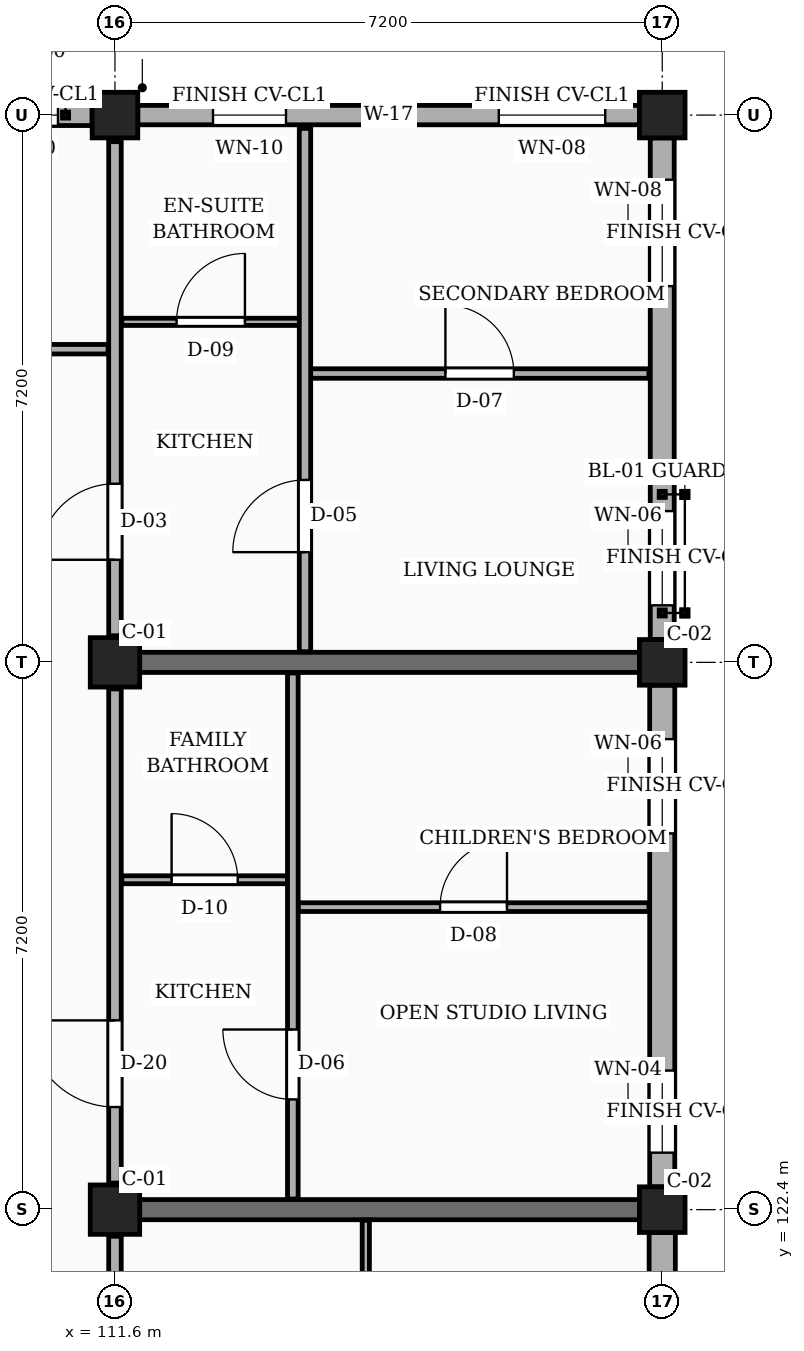
"""IFC4 building model, lengths in metres.
Left out: names, types, materials, properties, quantities, classifications, styles, units other than length and angle.
Written with IfcOpenShell. Run it as: python <this file> out.ifc"""

import sys

from ifc_helpers import new_model, si_unit, direction, frame, frame_2d, origin, origin_2d, place, context, subcontext, project, spatial, rectangle, extrude, element, fill, save


model = new_model("IFC4")
c1 = context("Model", 3, precision=1e-05, world=origin(), true_north=direction((0.0, 1.0)))
c2 = subcontext(c1, "Body", "Model", "MODEL_VIEW")
j1 = project(units=[si_unit("LENGTHUNIT", "METRE"), si_unit("PLANEANGLEUNIT", "RADIAN")], contexts=[c1])
p1 = place(None, origin())
s1 = spatial("IfcSite", under=j1, at=p1, CompositionType="ELEMENT")
p2 = place(p1, origin())
s2 = spatial("IfcBuilding", under=s1, at=p2, CompositionType="ELEMENT")
p3 = place(p2, frame((0.0, 0.0, 7.65)))
s3 = spatial("IfcBuildingStorey", under=s2, at=p3, CompositionType="ELEMENT", Elevation=7.65)
for number, where, z_axis, x_axis in (
    (1, (111.6, 122.4, 0.0), (0.0, 0.0, 1.0), (1.0, 0.0, 0.0)),
    (2, (111.6, 129.6, 0.0), (0.0, 0.0, 1.0), (1.0, 0.0, 0.0)),
):
    element("IfcColumn", number, at=place(p3, frame(where, z_axis=z_axis, x_axis=x_axis)), inside=s3, PredefinedType="COLUMN", context=c2, shape_type="SweptSolid", body=[
        extrude(rectangle(XDim=0.65, YDim=0.65, at=origin_2d()), origin(), (0.0, 0.0, 1.0), 3.15),
    ])
for number, where, z_axis, x_axis in (
    (3, (111.6, 136.8, 0.0), (0.0, 0.0, 1.0), (1.0, 0.0, 0.0)),
    (4, (118.8, 122.4, 0.0), (0.0, 0.0, 1.0), (1.0, 0.0, 0.0)),
    (5, (118.8, 129.6, 0.0), (0.0, 0.0, 1.0), (1.0, 0.0, 0.0)),
    (6, (118.8, 136.8, 0.0), (0.0, 0.0, 1.0), (1.0, 0.0, 0.0)),
):
    element("IfcColumn", number, at=place(p3, frame(where, z_axis=z_axis, x_axis=x_axis)), inside=s3, PredefinedType="COLUMN", context=c2, shape_type="SweptSolid", body=[
        extrude(rectangle(XDim=0.6, YDim=0.6, at=origin_2d()), origin(), (0.0, 0.0, 1.0), 3.15),
    ])
for number, where, z_axis, x_axis in (
    (7, (111.925, 122.4, 0.0), (0.0, 0.0, 1.0), (1.0, 0.0, 0.0)),
    (8, (111.925, 129.6, 0.0), (0.0, 0.0, 1.0), (1.0, 0.0, 0.0)),
):
    element("IfcWall", number, at=place(p3, frame(where, z_axis=z_axis, x_axis=x_axis)), inside=s3, PredefinedType="SOLIDWALL", context=c2, shape_type="SweptSolid", body=[
        extrude(rectangle(XDim=6.575, YDim=0.265, at=frame_2d((3.288, 0.0))), origin(), (0.0, 0.0, 1.0), 2.19),
    ])
p4 = place(p3, frame((118.8, 115.5, 0.0), z_axis=(0.0, 0.0, 1.0), x_axis=(0.0, 1.0, 0.0)))
e9 = element("IfcWall", 9, at=p4, inside=s3, PredefinedType="SOLIDWALL", context=c2, shape_type="SweptSolid", body=[
    extrude(rectangle(XDim=6.6, YDim=0.345, at=frame_2d((3.3, 0.0))), origin(), (0.0, 0.0, 1.0), 2.46),
])
p5 = place(p4, frame((0.45, 0.0, 0.78)))
e10 = element("IfcOpeningElement", 10, at=p5, cuts=e9, PredefinedType="OPENING", context=c2, shape_type="SweptSolid", body=[
    extrude(rectangle(XDim=0.92, YDim=1.15, at=frame_2d((0.46, 0.575))), frame((0.0, 0.183, 0.0), z_axis=(0.0, -1.0, 0.0), x_axis=(1.0, 0.0, 0.0)), (0.0, 0.0, 1.0), 0.365),
])
p6 = place(p4, frame((4.65, 0.0, 0.78)))
e11 = element("IfcOpeningElement", 11, at=p6, cuts=e9, PredefinedType="OPENING", context=c2, shape_type="SweptSolid", body=[
    extrude(rectangle(XDim=1.08, YDim=1.15, at=frame_2d((0.54, 0.575))), frame((0.0, 0.183, 0.0), z_axis=(0.0, -1.0, 0.0), x_axis=(1.0, 0.0, 0.0)), (0.0, 0.0, 1.0), 0.365),
])
p7 = place(p3, frame((118.8, 122.7, 0.0), z_axis=(0.0, 0.0, 1.0), x_axis=(0.0, 1.0, 0.0)))
e12 = element("IfcWall", 12, at=p7, inside=s3, PredefinedType="SOLIDWALL", context=c2, shape_type="SweptSolid", body=[
    extrude(rectangle(XDim=6.6, YDim=0.33, at=frame_2d((3.3, 0.0))), origin(), (0.0, 0.0, 1.0), 2.46),
])
p8 = place(p7, frame((0.45, 0.0, 0.78)))
e13 = element("IfcOpeningElement", 13, at=p8, cuts=e12, PredefinedType="OPENING", context=c2, shape_type="SweptSolid", body=[
    extrude(rectangle(XDim=1.08, YDim=1.15, at=frame_2d((0.54, 0.575))), frame((0.0, 0.175, 0.0), z_axis=(0.0, -1.0, 0.0), x_axis=(1.0, 0.0, 0.0)), (0.0, 0.0, 1.0), 0.35),
])
p9 = place(p7, frame((4.65, 0.0, 0.78)))
e14 = element("IfcOpeningElement", 14, at=p9, cuts=e12, PredefinedType="OPENING", context=c2, shape_type="SweptSolid", body=[
    extrude(rectangle(XDim=1.24, YDim=1.15, at=frame_2d((0.62, 0.575))), frame((0.0, 0.175, 0.0), z_axis=(0.0, -1.0, 0.0), x_axis=(1.0, 0.0, 0.0)), (0.0, 0.0, 1.0), 0.35),
])
p10 = place(p3, frame((118.8, 129.9, 0.0), z_axis=(0.0, 0.0, 1.0), x_axis=(0.0, 1.0, 0.0)))
e15 = element("IfcWall", 15, at=p10, inside=s3, PredefinedType="SOLIDWALL", context=c2, shape_type="SweptSolid", body=[
    extrude(rectangle(XDim=6.6, YDim=0.315, at=frame_2d((3.3, 0.0))), origin(), (0.0, 0.0, 1.0), 2.46),
])
p11 = place(p10, frame((0.45, 0.0, 0.78)))
e16 = element("IfcOpeningElement", 16, at=p11, cuts=e15, PredefinedType="OPENING", context=c2, shape_type="SweptSolid", body=[
    extrude(rectangle(XDim=1.24, YDim=1.15, at=frame_2d((0.62, 0.575))), frame((0.0, 0.167, 0.0), z_axis=(0.0, -1.0, 0.0), x_axis=(1.0, 0.0, 0.0)), (0.0, 0.0, 1.0), 0.335),
])
p12 = place(p10, frame((4.65, 0.0, 0.78)))
e17 = element("IfcOpeningElement", 17, at=p12, cuts=e15, PredefinedType="OPENING", context=c2, shape_type="SweptSolid", body=[
    extrude(rectangle(XDim=1.4, YDim=1.15, at=frame_2d((0.7, 0.575))), frame((0.0, 0.167, 0.0), z_axis=(0.0, -1.0, 0.0), x_axis=(1.0, 0.0, 0.0)), (0.0, 0.0, 1.0), 0.335),
])
p13 = place(p3, frame((118.5, 136.8, 0.0), z_axis=(0.0, 0.0, 1.0), x_axis=(-1.0, 0.0, 0.0)))
e18 = element("IfcWall", 18, at=p13, inside=s3, PredefinedType="SOLIDWALL", context=c2, shape_type="SweptSolid", body=[
    extrude(rectangle(XDim=6.6, YDim=0.255, at=frame_2d((3.3, 0.0))), origin(), (0.0, 0.0, 1.0), 2.46),
])
p14 = place(p13, frame((0.45, 0.0, 0.78)))
e19 = element("IfcOpeningElement", 19, at=p14, cuts=e18, PredefinedType="OPENING", context=c2, shape_type="SweptSolid", body=[
    extrude(rectangle(XDim=1.4, YDim=1.15, at=frame_2d((0.7, 0.575))), frame((0.0, 0.137, 0.0), z_axis=(0.0, -1.0, 0.0), x_axis=(1.0, 0.0, 0.0)), (0.0, 0.0, 1.0), 0.275),
])
p15 = place(p13, frame((4.65, 0.0, 0.78)))
e20 = element("IfcOpeningElement", 20, at=p15, cuts=e18, PredefinedType="OPENING", context=c2, shape_type="SweptSolid", body=[
    extrude(rectangle(XDim=0.96, YDim=1.26, at=frame_2d((0.48, 0.63))), frame((0.0, 0.137, 0.0), z_axis=(0.0, -1.0, 0.0), x_axis=(1.0, 0.0, 0.0)), (0.0, 0.0, 1.0), 0.275),
])
p16 = place(p3, frame((111.3, 136.8, 0.0), z_axis=(0.0, 0.0, 1.0), x_axis=(-1.0, 0.0, 0.0)))
e21 = element("IfcWall", 21, at=p16, inside=s3, PredefinedType="SOLIDWALL", context=c2, shape_type="SweptSolid", body=[
    extrude(rectangle(XDim=6.6, YDim=0.275, at=frame_2d((3.3, 0.0))), origin(), (0.0, 0.0, 1.0), 2.46),
])
p17 = place(p16, frame((0.45, 0.0, 0.78)))
e22 = element("IfcOpeningElement", 22, at=p17, cuts=e21, PredefinedType="OPENING", context=c2, shape_type="SweptSolid", body=[
    extrude(rectangle(XDim=0.96, YDim=1.26, at=frame_2d((0.48, 0.63))), frame((0.0, 0.147, 0.0), z_axis=(0.0, -1.0, 0.0), x_axis=(1.0, 0.0, 0.0)), (0.0, 0.0, 1.0), 0.295),
])
p18 = place(p16, frame((4.65, 0.0, 0.78)))
e23 = element("IfcOpeningElement", 23, at=p18, cuts=e21, PredefinedType="OPENING", context=c2, shape_type="SweptSolid", body=[
    extrude(rectangle(XDim=1.12, YDim=1.26, at=frame_2d((0.56, 0.63))), frame((0.0, 0.147, 0.0), z_axis=(0.0, -1.0, 0.0), x_axis=(1.0, 0.0, 0.0)), (0.0, 0.0, 1.0), 0.295),
])
p19 = place(p3, frame((111.6, 115.55, 0.0), z_axis=(0.0, 0.0, 1.0), x_axis=(0.0, 1.0, 0.0)))
e24 = element("IfcWall", 24, at=p19, inside=s3, PredefinedType="PARTITIONING", context=c2, shape_type="SweptSolid", body=[
    extrude(rectangle(XDim=6.5, YDim=0.165, at=frame_2d((3.25, 0.0))), origin(), (0.0, 0.0, 1.0), 2.24),
])
p20 = place(p19, frame((1.1, 0.0, 0.0)))
e25 = element("IfcOpeningElement", 25, at=p20, cuts=e24, PredefinedType="OPENING", context=c2, shape_type="SweptSolid", body=[
    extrude(rectangle(XDim=0.94, YDim=2.12, at=frame_2d((0.47, 1.06))), frame((0.0, 0.093, 0.0), z_axis=(0.0, -1.0, 0.0), x_axis=(1.0, 0.0, 0.0)), (0.0, 0.0, 1.0), 0.185),
])
p21 = place(p3, frame((111.6, 122.75, 0.0), z_axis=(0.0, 0.0, 1.0), x_axis=(0.0, 1.0, 0.0)))
e26 = element("IfcWall", 26, at=p21, inside=s3, PredefinedType="PARTITIONING", context=c2, shape_type="SweptSolid", body=[
    extrude(rectangle(XDim=6.5, YDim=0.165, at=frame_2d((3.25, 0.0))), origin(), (0.0, 0.0, 1.0), 2.24),
])
p22 = place(p21, frame((1.0, 0.0, 0.0)))
e27 = element("IfcOpeningElement", 27, at=p22, cuts=e26, PredefinedType="OPENING", context=c2, shape_type="SweptSolid", body=[
    extrude(rectangle(XDim=1.14, YDim=2.18, at=frame_2d((0.57, 1.09))), frame((0.0, 0.093, 0.0), z_axis=(0.0, -1.0, 0.0), x_axis=(1.0, 0.0, 0.0)), (0.0, 0.0, 1.0), 0.185),
])
p23 = place(p3, frame((111.6, 129.95, 0.0), z_axis=(0.0, 0.0, 1.0), x_axis=(0.0, 1.0, 0.0)))
e28 = element("IfcWall", 28, at=p23, inside=s3, PredefinedType="PARTITIONING", context=c2, shape_type="SweptSolid", body=[
    extrude(rectangle(XDim=6.5, YDim=0.165, at=frame_2d((3.25, 0.0))), origin(), (0.0, 0.0, 1.0), 2.24),
])
p24 = place(p23, frame((1.0, 0.0, 0.0)))
e29 = element("IfcOpeningElement", 29, at=p24, cuts=e28, PredefinedType="OPENING", context=c2, shape_type="SweptSolid", body=[
    extrude(rectangle(XDim=1.0, YDim=2.15, at=frame_2d((0.5, 1.075))), frame((0.0, 0.093, 0.0), z_axis=(0.0, -1.0, 0.0), x_axis=(1.0, 0.0, 0.0)), (0.0, 0.0, 1.0), 0.185),
])
p25 = place(p3, frame((114.9, 119.07, 0.0), z_axis=(0.0, 0.0, 1.0), x_axis=(0.0, 1.0, 0.0)))
e30 = element("IfcWall", 30, at=p25, inside=s3, PredefinedType="PARTITIONING", context=c2, shape_type="SweptSolid", body=[
    extrude(rectangle(XDim=3.19, YDim=0.095, at=frame_2d((1.595, 0.0))), origin(), (0.0, 0.0, 1.0), 2.325),
])
p26 = place(p3, frame((114.01, 126.38, 0.0), z_axis=(0.0, 0.0, 1.0), x_axis=(1.0, 0.0, 0.0)))
e31 = element("IfcWall", 31, at=p26, inside=s3, PredefinedType="PARTITIONING", context=c2, shape_type="SweptSolid", body=[
    extrude(rectangle(XDim=4.615, YDim=0.115, at=frame_2d((2.308, 0.0))), origin(), (0.0, 0.0, 1.0), 2.325),
])
p27 = place(p26, frame((1.867, 0.0, 0.0)))
e32 = element("IfcOpeningElement", 32, at=p27, cuts=e31, PredefinedType="OPENING", context=c2, shape_type="SweptSolid", body=[
    extrude(rectangle(XDim=0.88, YDim=2.08, at=frame_2d((0.44, 1.04))), frame((0.0, 0.067, 0.0), z_axis=(0.0, -1.0, 0.0), x_axis=(1.0, 0.0, 0.0)), (0.0, 0.0, 1.0), 0.135),
])
p28 = place(p3, frame((111.69, 126.74, 0.0), z_axis=(0.0, 0.0, 1.0), x_axis=(1.0, 0.0, 0.0)))
e33 = element("IfcWall", 33, at=p28, inside=s3, PredefinedType="PARTITIONING", context=c2, shape_type="SweptSolid", body=[
    extrude(rectangle(XDim=2.18, YDim=0.105, at=frame_2d((1.09, 0.0))), origin(), (0.0, 0.0, 1.0), 2.325),
])
p29 = place(p28, frame((0.655, 0.0, 0.0)))
e34 = element("IfcOpeningElement", 34, at=p29, cuts=e33, PredefinedType="OPENING", context=c2, shape_type="SweptSolid", body=[
    extrude(rectangle(XDim=0.87, YDim=2.05, at=frame_2d((0.435, 1.025))), frame((0.0, 0.062, 0.0), z_axis=(0.0, -1.0, 0.0), x_axis=(1.0, 0.0, 0.0)), (0.0, 0.0, 1.0), 0.125),
])
p30 = place(p3, frame((113.94, 122.54, 0.0), z_axis=(0.0, 0.0, 1.0), x_axis=(0.0, 1.0, 0.0)))
e35 = element("IfcWall", 35, at=p30, inside=s3, PredefinedType="PARTITIONING", context=c2, shape_type="SweptSolid", body=[
    extrude(rectangle(XDim=6.92, YDim=0.14, at=frame_2d((3.46, 0.0))), origin(), (0.0, 0.0, 1.0), 2.325),
])
p31 = place(p30, frame((1.31, 0.0, 0.0)))
e36 = element("IfcOpeningElement", 36, at=p31, cuts=e35, PredefinedType="OPENING", context=c2, shape_type="SweptSolid", body=[
    extrude(rectangle(XDim=0.92, YDim=2.1, at=frame_2d((0.46, 1.05))), frame((0.0, 0.08, 0.0), z_axis=(0.0, -1.0, 0.0), x_axis=(1.0, 0.0, 0.0)), (0.0, 0.0, 1.0), 0.16),
])
p32 = place(p3, frame((104.49, 133.72, 0.0), z_axis=(0.0, 0.0, 1.0), x_axis=(1.0, 0.0, 0.0)))
e37 = element("IfcWall", 37, at=p32, inside=s3, PredefinedType="PARTITIONING", context=c2, shape_type="SweptSolid", body=[
    extrude(rectangle(XDim=7.02, YDim=0.125, at=frame_2d((3.51, 0.0))), origin(), (0.0, 0.0, 1.0), 2.325),
])
p33 = place(p32, frame((2.85, 0.0, 0.0)))
e38 = element("IfcOpeningElement", 38, at=p33, cuts=e37, PredefinedType="OPENING", context=c2, shape_type="SweptSolid", body=[
    extrude(rectangle(XDim=1.02, YDim=2.15, at=frame_2d((0.51, 1.075))), frame((0.0, 0.073, 0.0), z_axis=(0.0, -1.0, 0.0), x_axis=(1.0, 0.0, 0.0)), (0.0, 0.0, 1.0), 0.145),
])
p34 = place(p3, frame((114.17, 133.4, 0.0), z_axis=(0.0, 0.0, 1.0), x_axis=(1.0, 0.0, 0.0)))
e39 = element("IfcWall", 39, at=p34, inside=s3, PredefinedType="PARTITIONING", context=c2, shape_type="SweptSolid", body=[
    extrude(rectangle(XDim=4.455, YDim=0.125, at=frame_2d((2.228, 0.0))), origin(), (0.0, 0.0, 1.0), 2.325),
])
p35 = place(p34, frame((1.778, 0.0, 0.0)))
e40 = element("IfcOpeningElement", 40, at=p35, cuts=e39, PredefinedType="OPENING", context=c2, shape_type="SweptSolid", body=[
    extrude(rectangle(XDim=0.9, YDim=2.1, at=frame_2d((0.45, 1.05))), frame((0.0, 0.073, 0.0), z_axis=(0.0, -1.0, 0.0), x_axis=(1.0, 0.0, 0.0)), (0.0, 0.0, 1.0), 0.145),
])
p36 = place(p3, frame((111.69, 134.08, 0.0), z_axis=(0.0, 0.0, 1.0), x_axis=(1.0, 0.0, 0.0)))
e41 = element("IfcWall", 41, at=p36, inside=s3, PredefinedType="PARTITIONING", context=c2, shape_type="SweptSolid", body=[
    extrude(rectangle(XDim=2.34, YDim=0.095, at=frame_2d((1.17, 0.0))), origin(), (0.0, 0.0, 1.0), 2.325),
])
p37 = place(p36, frame((0.72, 0.0, 0.0)))
e42 = element("IfcOpeningElement", 42, at=p37, cuts=e41, PredefinedType="OPENING", context=c2, shape_type="SweptSolid", body=[
    extrude(rectangle(XDim=0.9, YDim=2.05, at=frame_2d((0.45, 1.025))), frame((0.0, 0.058, 0.0), z_axis=(0.0, -1.0, 0.0), x_axis=(1.0, 0.0, 0.0)), (0.0, 0.0, 1.0), 0.115),
])
p38 = place(p3, frame((114.1, 129.74, 0.0), z_axis=(0.0, 0.0, 1.0), x_axis=(0.0, 1.0, 0.0)))
e43 = element("IfcWall", 43, at=p38, inside=s3, PredefinedType="PARTITIONING", context=c2, shape_type="SweptSolid", body=[
    extrude(rectangle(XDim=6.885, YDim=0.15, at=frame_2d((3.442, 0.0))), origin(), (0.0, 0.0, 1.0), 2.325),
])
p39 = place(p38, frame((1.31, 0.0, 0.0)))
e44 = element("IfcOpeningElement", 44, at=p39, cuts=e43, PredefinedType="OPENING", context=c2, shape_type="SweptSolid", body=[
    extrude(rectangle(XDim=0.95, YDim=2.1, at=frame_2d((0.475, 1.05))), frame((0.0, 0.085, 0.0), z_axis=(0.0, -1.0, 0.0), x_axis=(1.0, 0.0, 0.0)), (0.0, 0.0, 1.0), 0.17),
])
p40 = place(p8, origin())
e45 = element("IfcWindow", 45, at=p40, inside=s3, PartitioningType="SINGLE_PANEL", PredefinedType="WINDOW", context=c2, shape_type="SweptSolid", body=[
    extrude(rectangle(XDim=1.08, YDim=1.15, at=frame_2d((0.54, 0.575))), frame((0.0, 0.03, 0.0), z_axis=(0.0, -1.0, 0.0), x_axis=(1.0, 0.0, 0.0)), (0.0, 0.0, 1.0), 0.06),
])
fill(e13, e45)
p41 = place(p9, origin())
e46 = element("IfcWindow", 46, at=p41, inside=s3, PartitioningType="SINGLE_PANEL", PredefinedType="WINDOW", context=c2, shape_type="SweptSolid", body=[
    extrude(rectangle(XDim=1.24, YDim=1.15, at=frame_2d((0.62, 0.575))), frame((0.0, 0.03, 0.0), z_axis=(0.0, -1.0, 0.0), x_axis=(1.0, 0.0, 0.0)), (0.0, 0.0, 1.0), 0.06),
])
fill(e14, e46)
p42 = place(p11, origin())
e47 = element("IfcWindow", 47, at=p42, inside=s3, PartitioningType="SINGLE_PANEL", PredefinedType="WINDOW", context=c2, shape_type="SweptSolid", body=[
    extrude(rectangle(XDim=1.24, YDim=1.15, at=frame_2d((0.62, 0.575))), frame((0.0, 0.03, 0.0), z_axis=(0.0, -1.0, 0.0), x_axis=(1.0, 0.0, 0.0)), (0.0, 0.0, 1.0), 0.06),
])
fill(e16, e47)
p43 = place(p12, origin())
e48 = element("IfcWindow", 48, at=p43, inside=s3, PartitioningType="SINGLE_PANEL", PredefinedType="WINDOW", context=c2, shape_type="SweptSolid", body=[
    extrude(rectangle(XDim=1.4, YDim=1.15, at=frame_2d((0.7, 0.575))), frame((0.0, 0.03, 0.0), z_axis=(0.0, -1.0, 0.0), x_axis=(1.0, 0.0, 0.0)), (0.0, 0.0, 1.0), 0.06),
])
fill(e17, e48)
p44 = place(p14, origin())
e49 = element("IfcWindow", 49, at=p44, inside=s3, PartitioningType="SINGLE_PANEL", PredefinedType="WINDOW", context=c2, shape_type="SweptSolid", body=[
    extrude(rectangle(XDim=1.4, YDim=1.15, at=frame_2d((0.7, 0.575))), frame((0.0, 0.03, 0.0), z_axis=(0.0, -1.0, 0.0), x_axis=(1.0, 0.0, 0.0)), (0.0, 0.0, 1.0), 0.06),
])
fill(e19, e49)
p45 = place(p15, origin())
e50 = element("IfcWindow", 50, at=p45, inside=s3, PartitioningType="SINGLE_PANEL", PredefinedType="WINDOW", context=c2, shape_type="SweptSolid", body=[
    extrude(rectangle(XDim=0.96, YDim=1.26, at=frame_2d((0.48, 0.63))), frame((0.0, 0.03, 0.0), z_axis=(0.0, -1.0, 0.0), x_axis=(1.0, 0.0, 0.0)), (0.0, 0.0, 1.0), 0.06),
])
fill(e20, e50)
p46 = place(p17, origin())
e51 = element("IfcWindow", 51, at=p46, inside=s3, PartitioningType="SINGLE_PANEL", PredefinedType="WINDOW", context=c2, shape_type="SweptSolid", body=[
    extrude(rectangle(XDim=0.96, YDim=1.26, at=frame_2d((0.48, 0.63))), frame((0.0, 0.03, 0.0), z_axis=(0.0, -1.0, 0.0), x_axis=(1.0, 0.0, 0.0)), (0.0, 0.0, 1.0), 0.06),
])
fill(e22, e51)
p47 = place(p22, origin())
e52 = element("IfcDoor", 52, at=p47, inside=s3, OperationType="SINGLE_SWING_RIGHT", PredefinedType="DOOR", context=c2, shape_type="SweptSolid", body=[
    extrude(rectangle(XDim=1.14, YDim=2.18, at=frame_2d((0.57, 1.09))), frame((0.0, 0.025, 0.0), z_axis=(0.0, -1.0, 0.0), x_axis=(1.0, 0.0, 0.0)), (0.0, 0.0, 1.0), 0.05),
])
fill(e27, e52)
p48 = place(p24, origin())
e53 = element("IfcDoor", 53, at=p48, inside=s3, OperationType="SINGLE_SWING_LEFT", PredefinedType="DOOR", context=c2, shape_type="SweptSolid", body=[
    extrude(rectangle(XDim=1.0, YDim=2.15, at=frame_2d((0.5, 1.075))), frame((0.0, 0.025, 0.0), z_axis=(0.0, -1.0, 0.0), x_axis=(1.0, 0.0, 0.0)), (0.0, 0.0, 1.0), 0.05),
])
fill(e29, e53)
p49 = place(p27, origin())
e54 = element("IfcDoor", 54, at=p49, inside=s3, OperationType="SINGLE_SWING_RIGHT", PredefinedType="DOOR", context=c2, shape_type="SweptSolid", body=[
    extrude(rectangle(XDim=0.88, YDim=2.08, at=frame_2d((0.44, 1.04))), frame((0.0, 0.025, 0.0), z_axis=(0.0, -1.0, 0.0), x_axis=(1.0, 0.0, 0.0)), (0.0, 0.0, 1.0), 0.05),
])
fill(e32, e54)
p50 = place(p29, origin())
e55 = element("IfcDoor", 55, at=p50, inside=s3, OperationType="SINGLE_SWING_LEFT", PredefinedType="DOOR", context=c2, shape_type="SweptSolid", body=[
    extrude(rectangle(XDim=0.87, YDim=2.05, at=frame_2d((0.435, 1.025))), frame((0.0, 0.025, 0.0), z_axis=(0.0, -1.0, 0.0), x_axis=(1.0, 0.0, 0.0)), (0.0, 0.0, 1.0), 0.05),
])
fill(e34, e55)
p51 = place(p31, origin())
e56 = element("IfcDoor", 56, at=p51, inside=s3, OperationType="SINGLE_SWING_RIGHT", PredefinedType="DOOR", context=c2, shape_type="SweptSolid", body=[
    extrude(rectangle(XDim=0.92, YDim=2.1, at=frame_2d((0.46, 1.05))), frame((0.0, 0.025, 0.0), z_axis=(0.0, -1.0, 0.0), x_axis=(1.0, 0.0, 0.0)), (0.0, 0.0, 1.0), 0.05),
])
fill(e36, e56)
p52 = place(p35, origin())
e57 = element("IfcDoor", 57, at=p52, inside=s3, OperationType="SINGLE_SWING_LEFT", PredefinedType="DOOR", context=c2, shape_type="SweptSolid", body=[
    extrude(rectangle(XDim=0.9, YDim=2.1, at=frame_2d((0.45, 1.05))), frame((0.0, 0.025, 0.0), z_axis=(0.0, -1.0, 0.0), x_axis=(1.0, 0.0, 0.0)), (0.0, 0.0, 1.0), 0.05),
])
fill(e40, e57)
p53 = place(p37, origin())
e58 = element("IfcDoor", 58, at=p53, inside=s3, OperationType="SINGLE_SWING_RIGHT", PredefinedType="DOOR", context=c2, shape_type="SweptSolid", body=[
    extrude(rectangle(XDim=0.9, YDim=2.05, at=frame_2d((0.45, 1.025))), frame((0.0, 0.025, 0.0), z_axis=(0.0, -1.0, 0.0), x_axis=(1.0, 0.0, 0.0)), (0.0, 0.0, 1.0), 0.05),
])
fill(e42, e58)
p54 = place(p39, origin())
e59 = element("IfcDoor", 59, at=p54, inside=s3, OperationType="SINGLE_SWING_LEFT", PredefinedType="DOOR", context=c2, shape_type="SweptSolid", body=[
    extrude(rectangle(XDim=0.95, YDim=2.1, at=frame_2d((0.475, 1.05))), frame((0.0, 0.025, 0.0), z_axis=(0.0, -1.0, 0.0), x_axis=(1.0, 0.0, 0.0)), (0.0, 0.0, 1.0), 0.05),
])
fill(e44, e59)
save(model, sys.argv[1])
